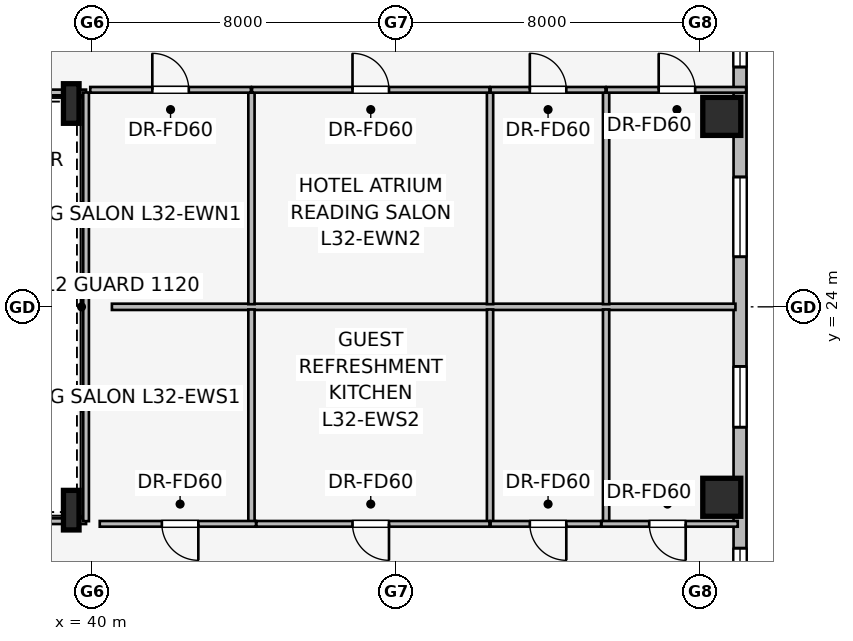
"""IFC4 building model, lengths in metres.
Left out: names, types, materials, properties, quantities, classifications, styles, units other than length and angle.
Written with IfcOpenShell. Run it as: python <this file> out.ifc"""

import sys

from ifc_helpers import new_model, si_unit, direction, frame, frame_2d, origin, origin_2d, place, context, subcontext, project, spatial, rectangle, i_section, extrude, element, fill, save


model = new_model("IFC4")
c1 = context("Model", 3, precision=1e-05, world=origin(), true_north=direction((0.0, 1.0)))
c2 = subcontext(c1, "Body", "Model", "MODEL_VIEW")
j1 = project(units=[si_unit("LENGTHUNIT", "METRE"), si_unit("PLANEANGLEUNIT", "RADIAN")], contexts=[c1])
p1 = place(None, origin())
s1 = spatial("IfcSite", under=j1, at=p1, CompositionType="ELEMENT")
p2 = place(p1, origin())
s2 = spatial("IfcBuilding", under=s1, at=p2, CompositionType="ELEMENT")
p3 = place(p2, frame((0.0, 0.0, 122.25)))
s3 = spatial("IfcBuildingStorey", under=s2, at=p3, CompositionType="ELEMENT", Elevation=122.25)
for number, where, z_axis, x_axis in (
    (1, (56.568, 18.989, 0.0), (0.0, 0.0, 1.0), (1.0, 0.0, 0.0)),
    (2, (56.568, 29.011, 0.0), (0.0, 0.0, 1.0), (1.0, 0.0, 0.0)),
):
    element("IfcColumn", number, at=place(p3, frame(where, z_axis=z_axis, x_axis=x_axis)), inside=s3, PredefinedType="COLUMN", context=c2, shape_type="SweptSolid", body=[
        extrude(rectangle(XDim=1.0, YDim=1.0, at=origin_2d()), origin(), (0.0, 0.0, 1.0), 3.45),
    ])
for number, where, z_axis, x_axis in (
    (3, (39.45, 18.65, 0.0), (0.0, 0.0, 1.0), (1.0, 0.0, 0.0)),
    (4, (39.45, 29.35, 0.0), (0.0, 0.0, 1.0), (1.0, 0.0, 0.0)),
):
    element("IfcColumn", number, at=place(p3, frame(where, z_axis=z_axis, x_axis=x_axis)), inside=s3, PredefinedType="COLUMN", context=c2, shape_type="SweptSolid", body=[
        extrude(i_section(OverallWidth=0.41, OverallDepth=1.041, WebThickness=0.031, FlangeThickness=0.056, at=origin_2d()), origin(), (0.0, 0.0, 1.0), 3.45),
    ])
p4 = place(p3, frame((57.048, 32.352, 0.0), z_axis=(0.0, 0.0, 1.0), x_axis=(0.0, -1.0, 0.0)))
e5 = element("IfcWall", 5, at=p4, inside=s3, PredefinedType="STANDARD", context=c2, shape_type="SweptSolid", body=[
    extrude(rectangle(XDim=16.704, YDim=0.34, at=frame_2d((8.352, 0.0))), origin(), (0.0, 0.0, 1.0), 3.19),
])
p5 = place(p4, frame((0.992, 0.0, 0.75)))
e6 = element("IfcOpeningElement", 6, at=p5, cuts=e5, PredefinedType="OPENING", context=c2, shape_type="SweptSolid", body=[
    extrude(rectangle(XDim=1.05, YDim=1.4, at=frame_2d((0.525, 0.7))), frame((0.0, 0.18, 0.0), z_axis=(0.0, -1.0, 0.0), x_axis=(1.0, 0.0, 0.0)), (0.0, 0.0, 1.0), 0.36),
])
p6 = place(p4, frame((4.935, 0.0, 0.75)))
e7 = element("IfcOpeningElement", 7, at=p6, cuts=e5, PredefinedType="OPENING", context=c2, shape_type="SweptSolid", body=[
    extrude(rectangle(XDim=2.1, YDim=1.5, at=frame_2d((1.05, 0.75))), frame((0.0, 0.18, 0.0), z_axis=(0.0, -1.0, 0.0), x_axis=(1.0, 0.0, 0.0)), (0.0, 0.0, 1.0), 0.36),
])
p7 = place(p4, frame((9.919, 0.0, 0.75)))
e8 = element("IfcOpeningElement", 8, at=p7, cuts=e5, PredefinedType="OPENING", context=c2, shape_type="SweptSolid", body=[
    extrude(rectangle(XDim=1.6, YDim=1.55, at=frame_2d((0.8, 0.775))), frame((0.0, 0.18, 0.0), z_axis=(0.0, -1.0, 0.0), x_axis=(1.0, 0.0, 0.0)), (0.0, 0.0, 1.0), 0.36),
])
p8 = place(p4, frame((14.702, 0.0, 0.75)))
e9 = element("IfcOpeningElement", 9, at=p8, cuts=e5, PredefinedType="OPENING", context=c2, shape_type="SweptSolid", body=[
    extrude(rectangle(XDim=1.05, YDim=1.4, at=frame_2d((0.525, 0.7))), frame((0.0, 0.18, 0.0), z_axis=(0.0, -1.0, 0.0), x_axis=(1.0, 0.0, 0.0)), (0.0, 0.0, 1.0), 0.36),
])
p9 = place(p3, frame((27.675, 18.36, 0.0), z_axis=(0.0, 0.0, 1.0), x_axis=(1.0, 0.0, 0.0)))
e10 = element("IfcWall", 10, at=p9, inside=s3, PredefinedType="PARTITIONING", context=c2, shape_type="SweptSolid", body=[
    extrude(rectangle(XDim=12.165, YDim=0.15, at=frame_2d((6.083, 0.0))), origin(), (0.0, 0.0, 1.0), 2.331),
])
p10 = place(p3, frame((39.84, 29.64, 0.0), z_axis=(0.0, 0.0, 1.0), x_axis=(-1.0, 0.0, 0.0)))
e11 = element("IfcWall", 11, at=p10, inside=s3, PredefinedType="PARTITIONING", context=c2, shape_type="SweptSolid", body=[
    extrude(rectangle(XDim=12.2, YDim=0.15, at=frame_2d((6.1, 0.0))), origin(), (0.0, 0.0, 1.0), 2.331),
])
p11 = place(p3, frame((39.84, 18.36, 0.0), z_axis=(0.0, 0.0, 1.0), x_axis=(0.0, 1.0, 0.0)))
e12 = element("IfcWall", 12, at=p11, inside=s3, PredefinedType="PARTITIONING", context=c2, shape_type="SweptSolid", body=[
    extrude(rectangle(XDim=11.28, YDim=0.15, at=frame_2d((5.64, 0.0))), origin(), (0.0, 0.0, 1.0), 3.19),
])
p12 = place(p3, frame((40.52, 24.0, 0.0), z_axis=(0.0, 0.0, 1.0), x_axis=(1.0, 0.0, 0.0)))
e13 = element("IfcWall", 13, at=p12, inside=s3, PredefinedType="PARTITIONING", context=c2, shape_type="SweptSolid", body=[
    extrude(rectangle(XDim=16.408, YDim=0.165, at=frame_2d((8.204, 0.0))), origin(), (0.0, 0.0, 1.0), 2.494),
])
for number, where, z_axis, x_axis in (
    (14, (44.192, 24.07, 0.0), (0.0, 0.0, 1.0), (0.0, 1.0, 0.0)),
    (15, (50.47, 24.07, 0.0), (0.0, 0.0, 1.0), (0.0, 1.0, 0.0)),
    (16, (53.524, 24.07, 0.0), (0.0, 0.0, 1.0), (0.0, 1.0, 0.0)),
):
    element("IfcWall", number, at=place(p3, frame(where, z_axis=z_axis, x_axis=x_axis)), inside=s3, PredefinedType="PARTITIONING", context=c2, shape_type="SweptSolid", body=[
        extrude(rectangle(XDim=5.64, YDim=0.165, at=frame_2d((2.82, 0.0))), origin(), (0.0, 0.0, 1.0), 3.19),
    ])
p13 = place(p3, frame((39.95, 29.71, 0.0), z_axis=(0.0, 0.0, 1.0), x_axis=(1.0, 0.0, 0.0)))
e17 = element("IfcWall", 17, at=p13, inside=s3, PredefinedType="PARTITIONING", context=c2, shape_type="SweptSolid", body=[
    extrude(rectangle(XDim=4.227, YDim=0.15, at=frame_2d((2.114, 0.0))), origin(), (0.0, 0.0, 1.0), 3.19),
])
p14 = place(p13, frame((1.633, 0.0, 0.0)))
e18 = element("IfcOpeningElement", 18, at=p14, cuts=e17, PredefinedType="OPENING", context=c2, shape_type="SweptSolid", body=[
    extrude(rectangle(XDim=0.96, YDim=2.0, at=frame_2d((0.48, 1.0))), frame((0.0, 0.085, 0.0), z_axis=(0.0, -1.0, 0.0), x_axis=(1.0, 0.0, 0.0)), (0.0, 0.0, 1.0), 0.17),
])
p15 = place(p3, frame((44.207, 29.71, 0.0), z_axis=(0.0, 0.0, 1.0), x_axis=(1.0, 0.0, 0.0)))
e19 = element("IfcWall", 19, at=p15, inside=s3, PredefinedType="PARTITIONING", context=c2, shape_type="SweptSolid", body=[
    extrude(rectangle(XDim=6.248, YDim=0.15, at=frame_2d((3.124, 0.0))), origin(), (0.0, 0.0, 1.0), 3.19),
])
p16 = place(p15, frame((2.644, 0.0, 0.0)))
e20 = element("IfcOpeningElement", 20, at=p16, cuts=e19, PredefinedType="OPENING", context=c2, shape_type="SweptSolid", body=[
    extrude(rectangle(XDim=0.96, YDim=2.0, at=frame_2d((0.48, 1.0))), frame((0.0, 0.085, 0.0), z_axis=(0.0, -1.0, 0.0), x_axis=(1.0, 0.0, 0.0)), (0.0, 0.0, 1.0), 0.17),
])
p17 = place(p3, frame((50.485, 29.71, 0.0), z_axis=(0.0, 0.0, 1.0), x_axis=(1.0, 0.0, 0.0)))
e21 = element("IfcWall", 21, at=p17, inside=s3, PredefinedType="PARTITIONING", context=c2, shape_type="SweptSolid", body=[
    extrude(rectangle(XDim=3.024, YDim=0.15, at=frame_2d((1.512, 0.0))), origin(), (0.0, 0.0, 1.0), 3.19),
])
p18 = place(p17, frame((1.032, 0.0, 0.0)))
e22 = element("IfcOpeningElement", 22, at=p18, cuts=e21, PredefinedType="OPENING", context=c2, shape_type="SweptSolid", body=[
    extrude(rectangle(XDim=0.96, YDim=2.0, at=frame_2d((0.48, 1.0))), frame((0.0, 0.085, 0.0), z_axis=(0.0, -1.0, 0.0), x_axis=(1.0, 0.0, 0.0)), (0.0, 0.0, 1.0), 0.17),
])
p19 = place(p3, frame((53.539, 29.71, 0.0), z_axis=(0.0, 0.0, 1.0), x_axis=(1.0, 0.0, 0.0)))
e23 = element("IfcWall", 23, at=p19, inside=s3, PredefinedType="PARTITIONING", context=c2, shape_type="SweptSolid", body=[
    extrude(rectangle(XDim=3.669, YDim=0.15, at=frame_2d((1.834, 0.0))), origin(), (0.0, 0.0, 1.0), 3.19),
])
p20 = place(p19, frame((1.369, 0.0, 0.0)))
e24 = element("IfcOpeningElement", 24, at=p20, cuts=e23, PredefinedType="OPENING", context=c2, shape_type="SweptSolid", body=[
    extrude(rectangle(XDim=0.96, YDim=2.0, at=frame_2d((0.48, 1.0))), frame((0.0, 0.085, 0.0), z_axis=(0.0, -1.0, 0.0), x_axis=(1.0, 0.0, 0.0)), (0.0, 0.0, 1.0), 0.17),
])
for number, where, z_axis, x_axis in (
    (25, (44.192, 18.29, 0.0), (0.0, 0.0, 1.0), (0.0, 1.0, 0.0)),
    (26, (50.47, 18.29, 0.0), (0.0, 0.0, 1.0), (0.0, 1.0, 0.0)),
    (27, (53.524, 18.29, 0.0), (0.0, 0.0, 1.0), (0.0, 1.0, 0.0)),
):
    element("IfcWall", number, at=place(p3, frame(where, z_axis=z_axis, x_axis=x_axis)), inside=s3, PredefinedType="PARTITIONING", context=c2, shape_type="SweptSolid", body=[
        extrude(rectangle(XDim=5.64, YDim=0.165, at=frame_2d((2.82, 0.0))), origin(), (0.0, 0.0, 1.0), 3.19),
    ])
p21 = place(p3, frame((44.312, 18.29, 0.0), z_axis=(0.0, 0.0, 1.0), x_axis=(-1.0, 0.0, 0.0)))
e28 = element("IfcWall", 28, at=p21, inside=s3, PredefinedType="PARTITIONING", context=c2, shape_type="SweptSolid", body=[
    extrude(rectangle(XDim=4.112, YDim=0.15, at=frame_2d((2.056, 0.0))), origin(), (0.0, 0.0, 1.0), 3.19),
])
p22 = place(p21, frame((1.518, 0.0, 0.0)))
e29 = element("IfcOpeningElement", 29, at=p22, cuts=e28, PredefinedType="OPENING", context=c2, shape_type="SweptSolid", body=[
    extrude(rectangle(XDim=0.96, YDim=2.0, at=frame_2d((0.48, 1.0))), frame((0.0, 0.085, 0.0), z_axis=(0.0, -1.0, 0.0), x_axis=(1.0, 0.0, 0.0)), (0.0, 0.0, 1.0), 0.17),
])
p23 = place(p3, frame((50.455, 18.29, 0.0), z_axis=(0.0, 0.0, 1.0), x_axis=(-1.0, 0.0, 0.0)))
e30 = element("IfcWall", 30, at=p23, inside=s3, PredefinedType="PARTITIONING", context=c2, shape_type="SweptSolid", body=[
    extrude(rectangle(XDim=6.133, YDim=0.15, at=frame_2d((3.066, 0.0))), origin(), (0.0, 0.0, 1.0), 3.19),
])
p24 = place(p23, frame((2.644, 0.0, 0.0)))
e31 = element("IfcOpeningElement", 31, at=p24, cuts=e30, PredefinedType="OPENING", context=c2, shape_type="SweptSolid", body=[
    extrude(rectangle(XDim=0.96, YDim=2.0, at=frame_2d((0.48, 1.0))), frame((0.0, 0.085, 0.0), z_axis=(0.0, -1.0, 0.0), x_axis=(1.0, 0.0, 0.0)), (0.0, 0.0, 1.0), 0.17),
])
p25 = place(p3, frame((53.394, 18.29, 0.0), z_axis=(0.0, 0.0, 1.0), x_axis=(-1.0, 0.0, 0.0)))
e32 = element("IfcWall", 32, at=p25, inside=s3, PredefinedType="PARTITIONING", context=c2, shape_type="SweptSolid", body=[
    extrude(rectangle(XDim=2.909, YDim=0.15, at=frame_2d((1.455, 0.0))), origin(), (0.0, 0.0, 1.0), 3.19),
])
p26 = place(p25, frame((0.917, 0.0, 0.0)))
e33 = element("IfcOpeningElement", 33, at=p26, cuts=e32, PredefinedType="OPENING", context=c2, shape_type="SweptSolid", body=[
    extrude(rectangle(XDim=0.96, YDim=2.0, at=frame_2d((0.48, 1.0))), frame((0.0, 0.085, 0.0), z_axis=(0.0, -1.0, 0.0), x_axis=(1.0, 0.0, 0.0)), (0.0, 0.0, 1.0), 0.17),
])
p27 = place(p3, frame((56.988, 18.29, 0.0), z_axis=(0.0, 0.0, 1.0), x_axis=(-1.0, 0.0, 0.0)))
e34 = element("IfcWall", 34, at=p27, inside=s3, PredefinedType="PARTITIONING", context=c2, shape_type="SweptSolid", body=[
    extrude(rectangle(XDim=3.584, YDim=0.15, at=frame_2d((1.792, 0.0))), origin(), (0.0, 0.0, 1.0), 3.19),
])
p28 = place(p27, frame((1.369, 0.0, 0.0)))
e35 = element("IfcOpeningElement", 35, at=p28, cuts=e34, PredefinedType="OPENING", context=c2, shape_type="SweptSolid", body=[
    extrude(rectangle(XDim=0.96, YDim=2.0, at=frame_2d((0.48, 1.0))), frame((0.0, 0.085, 0.0), z_axis=(0.0, -1.0, 0.0), x_axis=(1.0, 0.0, 0.0)), (0.0, 0.0, 1.0), 0.17),
])
p29 = place(p5, origin())
e36 = element("IfcWindow", 36, at=p29, inside=s3, PartitioningType="SINGLE_PANEL", PredefinedType="WINDOW", context=c2, shape_type="SweptSolid", body=[
    extrude(rectangle(XDim=1.05, YDim=1.4, at=frame_2d((0.525, 0.7))), frame((0.0, 0.03, 0.0), z_axis=(0.0, -1.0, 0.0), x_axis=(1.0, 0.0, 0.0)), (0.0, 0.0, 1.0), 0.06),
])
fill(e6, e36)
p30 = place(p6, origin())
e37 = element("IfcWindow", 37, at=p30, inside=s3, PartitioningType="SINGLE_PANEL", PredefinedType="WINDOW", context=c2, shape_type="SweptSolid", body=[
    extrude(rectangle(XDim=2.1, YDim=1.5, at=frame_2d((1.05, 0.75))), frame((0.0, 0.03, 0.0), z_axis=(0.0, -1.0, 0.0), x_axis=(1.0, 0.0, 0.0)), (0.0, 0.0, 1.0), 0.06),
])
fill(e7, e37)
p31 = place(p7, origin())
e38 = element("IfcWindow", 38, at=p31, inside=s3, PartitioningType="SINGLE_PANEL", PredefinedType="WINDOW", context=c2, shape_type="SweptSolid", body=[
    extrude(rectangle(XDim=1.6, YDim=1.55, at=frame_2d((0.8, 0.775))), frame((0.0, 0.03, 0.0), z_axis=(0.0, -1.0, 0.0), x_axis=(1.0, 0.0, 0.0)), (0.0, 0.0, 1.0), 0.06),
])
fill(e8, e38)
p32 = place(p8, origin())
e39 = element("IfcWindow", 39, at=p32, inside=s3, PartitioningType="SINGLE_PANEL", PredefinedType="WINDOW", context=c2, shape_type="SweptSolid", body=[
    extrude(rectangle(XDim=1.05, YDim=1.4, at=frame_2d((0.525, 0.7))), frame((0.0, 0.03, 0.0), z_axis=(0.0, -1.0, 0.0), x_axis=(1.0, 0.0, 0.0)), (0.0, 0.0, 1.0), 0.06),
])
fill(e9, e39)
p33 = place(p14, origin())
e40 = element("IfcDoor", 40, at=p33, inside=s3, OperationType="SINGLE_SWING_LEFT", PredefinedType="DOOR", context=c2, shape_type="SweptSolid", body=[
    extrude(rectangle(XDim=0.96, YDim=2.0, at=frame_2d((0.48, 1.0))), frame((0.0, 0.025, 0.0), z_axis=(0.0, -1.0, 0.0), x_axis=(1.0, 0.0, 0.0)), (0.0, 0.0, 1.0), 0.05),
])
fill(e18, e40)
p34 = place(p16, origin())
e41 = element("IfcDoor", 41, at=p34, inside=s3, OperationType="SINGLE_SWING_LEFT", PredefinedType="DOOR", context=c2, shape_type="SweptSolid", body=[
    extrude(rectangle(XDim=0.96, YDim=2.0, at=frame_2d((0.48, 1.0))), frame((0.0, 0.025, 0.0), z_axis=(0.0, -1.0, 0.0), x_axis=(1.0, 0.0, 0.0)), (0.0, 0.0, 1.0), 0.05),
])
fill(e20, e41)
p35 = place(p18, origin())
e42 = element("IfcDoor", 42, at=p35, inside=s3, OperationType="SINGLE_SWING_LEFT", PredefinedType="DOOR", context=c2, shape_type="SweptSolid", body=[
    extrude(rectangle(XDim=0.96, YDim=2.0, at=frame_2d((0.48, 1.0))), frame((0.0, 0.025, 0.0), z_axis=(0.0, -1.0, 0.0), x_axis=(1.0, 0.0, 0.0)), (0.0, 0.0, 1.0), 0.05),
])
fill(e22, e42)
p36 = place(p20, origin())
e43 = element("IfcDoor", 43, at=p36, inside=s3, OperationType="SINGLE_SWING_LEFT", PredefinedType="DOOR", context=c2, shape_type="SweptSolid", body=[
    extrude(rectangle(XDim=0.96, YDim=2.0, at=frame_2d((0.48, 1.0))), frame((0.0, 0.025, 0.0), z_axis=(0.0, -1.0, 0.0), x_axis=(1.0, 0.0, 0.0)), (0.0, 0.0, 1.0), 0.05),
])
fill(e24, e43)
p37 = place(p22, origin())
e44 = element("IfcDoor", 44, at=p37, inside=s3, OperationType="SINGLE_SWING_LEFT", PredefinedType="DOOR", context=c2, shape_type="SweptSolid", body=[
    extrude(rectangle(XDim=0.96, YDim=2.0, at=frame_2d((0.48, 1.0))), frame((0.0, 0.025, 0.0), z_axis=(0.0, -1.0, 0.0), x_axis=(1.0, 0.0, 0.0)), (0.0, 0.0, 1.0), 0.05),
])
fill(e29, e44)
p38 = place(p24, origin())
e45 = element("IfcDoor", 45, at=p38, inside=s3, OperationType="SINGLE_SWING_LEFT", PredefinedType="DOOR", context=c2, shape_type="SweptSolid", body=[
    extrude(rectangle(XDim=0.96, YDim=2.0, at=frame_2d((0.48, 1.0))), frame((0.0, 0.025, 0.0), z_axis=(0.0, -1.0, 0.0), x_axis=(1.0, 0.0, 0.0)), (0.0, 0.0, 1.0), 0.05),
])
fill(e31, e45)
p39 = place(p26, origin())
e46 = element("IfcDoor", 46, at=p39, inside=s3, OperationType="SINGLE_SWING_LEFT", PredefinedType="DOOR", context=c2, shape_type="SweptSolid", body=[
    extrude(rectangle(XDim=0.96, YDim=2.0, at=frame_2d((0.48, 1.0))), frame((0.0, 0.025, 0.0), z_axis=(0.0, -1.0, 0.0), x_axis=(1.0, 0.0, 0.0)), (0.0, 0.0, 1.0), 0.05),
])
fill(e33, e46)
p40 = place(p28, origin())
e47 = element("IfcDoor", 47, at=p40, inside=s3, OperationType="SINGLE_SWING_LEFT", PredefinedType="DOOR", context=c2, shape_type="SweptSolid", body=[
    extrude(rectangle(XDim=0.96, YDim=2.0, at=frame_2d((0.48, 1.0))), frame((0.0, 0.025, 0.0), z_axis=(0.0, -1.0, 0.0), x_axis=(1.0, 0.0, 0.0)), (0.0, 0.0, 1.0), 0.05),
])
fill(e35, e47)
save(model, sys.argv[1])
